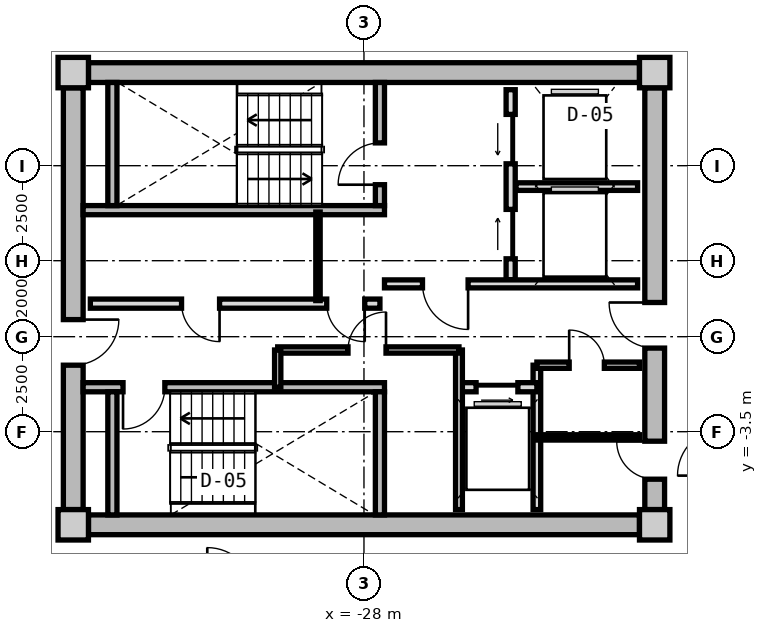
"""IFC4 building model, lengths in metres.
Left out: names, types, materials, properties, quantities, classifications, styles, units other than length and angle.
Written with IfcOpenShell. Run it as: python <this file> out.ifc"""

import sys

from ifc_helpers import new_model, si_unit, direction, frame, frame_2d, origin, origin_2d, place, context, subcontext, project, spatial, rectangle, extrude, source, transform, mapped, element, fill, save


model = new_model("IFC4")
c1 = context("Model", 3, precision=1e-05, world=origin(), true_north=direction((0.0, 1.0)))
c2 = subcontext(c1, "Body", "Model", "MODEL_VIEW")
j1 = project(units=[si_unit("LENGTHUNIT", "METRE"), si_unit("PLANEANGLEUNIT", "RADIAN")], contexts=[c1])
p1 = place(None, origin())
s1 = spatial("IfcSite", under=j1, at=p1, CompositionType="ELEMENT")
p2 = place(p1, origin())
s2 = spatial("IfcBuilding", under=s1, at=p2, CompositionType="ELEMENT")
p3 = place(p2, frame((0.0, 0.0, 229.15)))
s3 = spatial("IfcBuildingStorey", under=s2, at=p3, CompositionType="ELEMENT", Elevation=229.15)
m1 = source(origin(), c2, "Body", "SweptSolid", [
    extrude(rectangle(XDim=0.8, YDim=0.8, at=origin_2d()), origin(), (0.0, 0.0, 1.0), 3.05),
])
for number, where, z_axis, x_axis in (
    (1, (-35.65, -5.95, 0.0), (0.0, 0.0, 1.0), (1.0, 0.0, 0.0)),
    (2, (-20.35, -5.95, 0.0), (0.0, 0.0, 1.0), (1.0, 0.0, 0.0)),
    (3, (-20.35, 5.95, 0.0), (0.0, 0.0, 1.0), (1.0, 0.0, 0.0)),
    (4, (-35.65, 5.95, 0.0), (0.0, 0.0, 1.0), (1.0, 0.0, 0.0)),
):
    element("IfcColumn", number, at=place(p3, frame(where, z_axis=z_axis, x_axis=x_axis)), inside=s3, PredefinedType="COLUMN", context=c2, shape_type="MappedRepresentation", body=[
        mapped(m1, transform((0.0, 0.0, 0.0), x_axis=(1.0, 0.0, 0.0), y_axis=(0.0, 1.0, 0.0), z_axis=(0.0, 0.0, 1.0), scale=1.0)),
    ])
m2 = source(origin(), c2, "Body", "SweptSolid", [
    extrude(rectangle(XDim=14.5, YDim=0.52, at=frame_2d((7.25, 0.0))), origin(), (0.0, 0.0, 1.0), 2.81),
])
for number, where, z_axis, x_axis in (
    (5, (-35.25, 5.95, 0.0), (0.0, 0.0, 1.0), (1.0, 0.0, 0.0)),
    (6, (-20.75, -5.95, 0.0), (0.0, 0.0, 1.0), (-1.0, 0.0, 0.0)),
):
    element("IfcWall", number, at=place(p3, frame(where, z_axis=z_axis, x_axis=x_axis)), inside=s3, PredefinedType="SHEAR", context=c2, shape_type="MappedRepresentation", body=[
        mapped(m2, transform((0.0, 0.0, 0.0), x_axis=(1.0, 0.0, 0.0), y_axis=(0.0, 1.0, 0.0), z_axis=(0.0, 0.0, 1.0), scale=1.0)),
    ])
m3 = source(origin(), c2, "Body", "SweptSolid", [
    extrude(rectangle(XDim=11.1, YDim=0.52, at=frame_2d((5.55, 0.0))), origin(), (0.0, 0.0, 1.0), 2.81),
])
p4 = place(p3, frame((-35.65, -5.55, 0.0), z_axis=(0.0, 0.0, 1.0), x_axis=(0.0, 1.0, 0.0)))
e7 = element("IfcWall", 7, at=p4, inside=s3, PredefinedType="SHEAR", context=c2, shape_type="MappedRepresentation", body=[
    mapped(m3, transform((0.0, 0.0, 0.0), x_axis=(1.0, 0.0, 0.0), y_axis=(0.0, 1.0, 0.0), z_axis=(0.0, 0.0, 1.0), scale=1.0)),
])
p5 = place(p4, frame((3.8, 0.0, 0.0)))
e8 = element("IfcOpeningElement", 8, at=p5, cuts=e7, PredefinedType="OPENING", context=c2, shape_type="SweptSolid", body=[
    extrude(rectangle(XDim=1.2, YDim=2.15, at=frame_2d((0.6, 1.075))), frame((0.0, 0.27, 0.0), z_axis=(0.0, -1.0, 0.0), x_axis=(1.0, 0.0, 0.0)), (0.0, 0.0, 1.0), 0.54),
])
p6 = place(p3, frame((-20.35, 5.55, 0.0), z_axis=(0.0, 0.0, 1.0), x_axis=(0.0, -1.0, 0.0)))
e9 = element("IfcWall", 9, at=p6, inside=s3, PredefinedType="SHEAR", context=c2, shape_type="MappedRepresentation", body=[
    mapped(m3, transform((0.0, 0.0, 0.0), x_axis=(1.0, 0.0, 0.0), y_axis=(0.0, 1.0, 0.0), z_axis=(0.0, 0.0, 1.0), scale=1.0)),
])
p7 = place(p6, frame((5.65, 0.0, 0.0)))
e10 = element("IfcOpeningElement", 10, at=p7, cuts=e9, PredefinedType="OPENING", context=c2, shape_type="SweptSolid", body=[
    extrude(rectangle(XDim=1.2, YDim=2.15, at=frame_2d((0.6, 1.075))), frame((0.0, 0.27, 0.0), z_axis=(0.0, -1.0, 0.0), x_axis=(1.0, 0.0, 0.0)), (0.0, 0.0, 1.0), 0.54),
])
p8 = place(p6, frame((9.3, 0.0, 0.0)))
e11 = element("IfcOpeningElement", 11, at=p8, cuts=e9, PredefinedType="OPENING", context=c2, shape_type="SweptSolid", body=[
    extrude(rectangle(XDim=1.0, YDim=2.1, at=frame_2d((0.5, 1.05))), frame((0.0, 0.27, 0.0), z_axis=(0.0, -1.0, 0.0), x_axis=(1.0, 0.0, 0.0)), (0.0, 0.0, 1.0), 0.54),
])
m4 = source(origin(), c2, "Body", "SweptSolid", [
    extrude(rectangle(XDim=7.93, YDim=0.24, at=frame_2d((3.965, 0.0))), origin(), (0.0, 0.0, 1.0), 2.81),
])
p9 = place(p3, frame((-35.39, 2.33, 0.0), z_axis=(0.0, 0.0, 1.0), x_axis=(1.0, 0.0, 0.0)))
e12 = element("IfcWall", 12, at=p9, inside=s3, PredefinedType="PARTITIONING", context=c2, shape_type="MappedRepresentation", body=[
    mapped(m4, transform((0.0, 0.0, 0.0), x_axis=(1.0, 0.0, 0.0), y_axis=(0.0, 1.0, 0.0), z_axis=(0.0, 0.0, 1.0), scale=1.0)),
])
m5 = source(origin(), c2, "Body", "SweptSolid", [
    extrude(rectangle(XDim=3.24, YDim=0.24, at=frame_2d((1.62, 0.0))), origin(), (0.0, 0.0, 1.0), 2.81),
])
p10 = place(p3, frame((-34.62, 2.45, 0.0), z_axis=(0.0, 0.0, 1.0), x_axis=(0.0, 1.0, 0.0)))
e13 = element("IfcWall", 13, at=p10, inside=s3, PredefinedType="PARTITIONING", context=c2, shape_type="MappedRepresentation", body=[
    mapped(m5, transform((0.0, 0.0, 0.0), x_axis=(1.0, 0.0, 0.0), y_axis=(0.0, 1.0, 0.0), z_axis=(0.0, 0.0, 1.0), scale=1.0)),
])
p11 = place(p3, frame((-27.58, 2.45, 0.0), z_axis=(0.0, 0.0, 1.0), x_axis=(0.0, 1.0, 0.0)))
e14 = element("IfcWall", 14, at=p11, inside=s3, PredefinedType="PARTITIONING", context=c2, shape_type="MappedRepresentation", body=[
    mapped(m5, transform((0.0, 0.0, 0.0), x_axis=(1.0, 0.0, 0.0), y_axis=(0.0, 1.0, 0.0), z_axis=(0.0, 0.0, 1.0), scale=1.0)),
])
p12 = place(p11, frame((0.55, 0.0, 0.0)))
e15 = element("IfcOpeningElement", 15, at=p12, cuts=e14, PredefinedType="OPENING", context=c2, shape_type="SweptSolid", body=[
    extrude(rectangle(XDim=1.1, YDim=2.15, at=frame_2d((0.55, 1.075))), frame((0.0, 0.13, 0.0), z_axis=(0.0, -1.0, 0.0), x_axis=(1.0, 0.0, 0.0)), (0.0, 0.0, 1.0), 0.26),
])
p13 = place(p3, frame((-35.39, -2.33, 0.0), z_axis=(0.0, 0.0, 1.0), x_axis=(1.0, 0.0, 0.0)))
e16 = element("IfcWall", 16, at=p13, inside=s3, PredefinedType="PARTITIONING", context=c2, shape_type="MappedRepresentation", body=[
    mapped(m4, transform((0.0, 0.0, 0.0), x_axis=(1.0, 0.0, 0.0), y_axis=(0.0, 1.0, 0.0), z_axis=(0.0, 0.0, 1.0), scale=1.0)),
])
p14 = place(p13, frame((1.05, 0.0, 0.0)))
e17 = element("IfcOpeningElement", 17, at=p14, cuts=e16, PredefinedType="OPENING", context=c2, shape_type="SweptSolid", body=[
    extrude(rectangle(XDim=1.1, YDim=2.15, at=frame_2d((0.55, 1.075))), frame((0.0, 0.13, 0.0), z_axis=(0.0, -1.0, 0.0), x_axis=(1.0, 0.0, 0.0)), (0.0, 0.0, 1.0), 0.26),
])
for number, where, z_axis, x_axis in (
    (18, (-34.62, -5.69, 0.0), (0.0, 0.0, 1.0), (0.0, 1.0, 0.0)),
    (19, (-27.58, -5.69, 0.0), (0.0, 0.0, 1.0), (0.0, 1.0, 0.0)),
):
    element("IfcWall", number, at=place(p3, frame(where, z_axis=z_axis, x_axis=x_axis)), inside=s3, PredefinedType="PARTITIONING", context=c2, shape_type="MappedRepresentation", body=[
        mapped(m5, transform((0.0, 0.0, 0.0), x_axis=(1.0, 0.0, 0.0), y_axis=(0.0, 1.0, 0.0), z_axis=(0.0, 0.0, 1.0), scale=1.0)),
    ])
m6 = source(origin(), c2, "Body", "SweptSolid", [
    extrude(rectangle(XDim=5.0, YDim=0.24, at=frame_2d((2.5, 0.0))), origin(), (0.0, 0.0, 1.0), 2.795),
])
p15 = place(p3, frame((-24.14, 0.5, 0.0), z_axis=(0.0, 0.0, 1.0), x_axis=(0.0, 1.0, 0.0)))
e20 = element("IfcWall", 20, at=p15, inside=s3, PredefinedType="PARTITIONING", context=c2, shape_type="MappedRepresentation", body=[
    mapped(m6, transform((0.0, 0.0, 0.0), x_axis=(1.0, 0.0, 0.0), y_axis=(0.0, 1.0, 0.0), z_axis=(0.0, 0.0, 1.0), scale=1.0)),
])
p16 = place(p15, frame((3.05, 0.0, 0.0)))
e21 = element("IfcOpeningElement", 21, at=p16, cuts=e20, PredefinedType="OPENING", context=c2, shape_type="SweptSolid", body=[
    extrude(rectangle(XDim=1.3, YDim=2.2, at=frame_2d((0.65, 1.1))), frame((0.0, 0.13, 0.0), z_axis=(0.0, -1.0, 0.0), x_axis=(1.0, 0.0, 0.0)), (0.0, 0.0, 1.0), 0.26),
])
p17 = place(p15, frame((0.55, 0.0, 0.0)))
e22 = element("IfcOpeningElement", 22, at=p17, cuts=e20, PredefinedType="OPENING", context=c2, shape_type="SweptSolid", body=[
    extrude(rectangle(XDim=1.3, YDim=2.2, at=frame_2d((0.65, 1.1))), frame((0.0, 0.13, 0.0), z_axis=(0.0, -1.0, 0.0), x_axis=(1.0, 0.0, 0.0)), (0.0, 0.0, 1.0), 0.26),
])
m7 = source(origin(), c2, "Body", "SweptSolid", [
    extrude(rectangle(XDim=3.2, YDim=0.2, at=frame_2d((1.6, 0.0))), origin(), (0.0, 0.0, 1.0), 2.795),
])
p18 = place(p3, frame((-24.0, 2.95, 0.0), z_axis=(0.0, 0.0, 1.0), x_axis=(1.0, 0.0, 0.0)))
e23 = element("IfcWall", 23, at=p18, inside=s3, PredefinedType="PARTITIONING", context=c2, shape_type="MappedRepresentation", body=[
    mapped(m7, transform((0.0, 0.0, 0.0), x_axis=(1.0, 0.0, 0.0), y_axis=(0.0, 1.0, 0.0), z_axis=(0.0, 0.0, 1.0), scale=1.0)),
])
m8 = source(origin(), c2, "Body", "SweptSolid", [
    extrude(rectangle(XDim=6.66, YDim=0.21, at=frame_2d((3.33, 0.0))), origin(), (0.0, 0.0, 1.0), 2.795),
])
p19 = place(p3, frame((-27.46, 0.39, 0.0), z_axis=(0.0, 0.0, 1.0), x_axis=(1.0, 0.0, 0.0)))
e24 = element("IfcWall", 24, at=p19, inside=s3, PredefinedType="PARTITIONING", context=c2, shape_type="MappedRepresentation", body=[
    mapped(m8, transform((0.0, 0.0, 0.0), x_axis=(1.0, 0.0, 0.0), y_axis=(0.0, 1.0, 0.0), z_axis=(0.0, 0.0, 1.0), scale=1.0)),
])
p20 = place(p19, frame((1.0, 0.0, 0.0)))
e25 = element("IfcOpeningElement", 25, at=p20, cuts=e24, PredefinedType="OPENING", context=c2, shape_type="SweptSolid", body=[
    extrude(rectangle(XDim=1.2, YDim=2.15, at=frame_2d((0.6, 1.075))), frame((0.0, 0.115, 0.0), z_axis=(0.0, -1.0, 0.0), x_axis=(1.0, 0.0, 0.0)), (0.0, 0.0, 1.0), 0.23),
])
m9 = source(origin(), c2, "Body", "SweptSolid", [
    extrude(rectangle(XDim=7.62, YDim=0.24, at=frame_2d((3.81, 0.0))), origin(), (0.0, 0.0, 1.0), 2.795),
])
p21 = place(p3, frame((-35.2, -0.13, 0.0), z_axis=(0.0, 0.0, 1.0), x_axis=(1.0, 0.0, 0.0)))
e26 = element("IfcWall", 26, at=p21, inside=s3, PredefinedType="PARTITIONING", context=c2, shape_type="MappedRepresentation", body=[
    mapped(m9, transform((0.0, 0.0, 0.0), x_axis=(1.0, 0.0, 0.0), y_axis=(0.0, 1.0, 0.0), z_axis=(0.0, 0.0, 1.0), scale=1.0)),
])
p22 = place(p21, frame((6.22, 0.0, 0.0)))
e27 = element("IfcOpeningElement", 27, at=p22, cuts=e26, PredefinedType="OPENING", context=c2, shape_type="SweptSolid", body=[
    extrude(rectangle(XDim=1.0, YDim=2.1, at=frame_2d((0.5, 1.05))), frame((0.0, 0.13, 0.0), z_axis=(0.0, -1.0, 0.0), x_axis=(1.0, 0.0, 0.0)), (0.0, 0.0, 1.0), 0.26),
])
p23 = place(p21, frame((2.4, 0.0, 0.0)))
e28 = element("IfcOpeningElement", 28, at=p23, cuts=e26, PredefinedType="OPENING", context=c2, shape_type="SweptSolid", body=[
    extrude(rectangle(XDim=1.0, YDim=2.1, at=frame_2d((0.5, 1.05))), frame((0.0, 0.13, 0.0), z_axis=(0.0, -1.0, 0.0), x_axis=(1.0, 0.0, 0.0)), (0.0, 0.0, 1.0), 0.26),
])
m10 = source(origin(), c2, "Body", "SweptSolid", [
    extrude(rectangle(XDim=2.33, YDim=0.115, at=frame_2d((1.165, 0.0))), origin(), (0.0, 0.0, 1.0), 2.795),
])
p24 = place(p3, frame((-29.21, -0.05, 0.0), z_axis=(0.0, 0.0, 1.0), x_axis=(0.0, 1.0, 0.0)))
e29 = element("IfcWall", 29, at=p24, inside=s3, PredefinedType="PARTITIONING", context=c2, shape_type="MappedRepresentation", body=[
    mapped(m10, transform((0.0, 0.0, 0.0), x_axis=(1.0, 0.0, 0.0), y_axis=(0.0, 1.0, 0.0), z_axis=(0.0, 0.0, 1.0), scale=1.0)),
])
m11 = source(origin(), c2, "Body", "SweptSolid", [
    extrude(rectangle(XDim=3.8, YDim=0.2, at=frame_2d((1.9, 0.0))), origin(), (0.0, 0.0, 1.0), 2.795),
])
p25 = place(p3, frame((-23.45, -5.55, 0.0), z_axis=(0.0, 0.0, 1.0), x_axis=(0.0, 1.0, 0.0)))
e30 = element("IfcWall", 30, at=p25, inside=s3, PredefinedType="PARTITIONING", context=c2, shape_type="MappedRepresentation", body=[
    mapped(m11, transform((0.0, 0.0, 0.0), x_axis=(1.0, 0.0, 0.0), y_axis=(0.0, 1.0, 0.0), z_axis=(0.0, 0.0, 1.0), scale=1.0)),
])
m12 = source(origin(), c2, "Body", "SweptSolid", [
    extrude(rectangle(XDim=2.05, YDim=0.24, at=frame_2d((1.025, 0.0))), origin(), (0.0, 0.0, 1.0), 2.795),
])
p26 = place(p3, frame((-25.5, -2.33, 0.0), z_axis=(0.0, 0.0, 1.0), x_axis=(1.0, 0.0, 0.0)))
e31 = element("IfcWall", 31, at=p26, inside=s3, PredefinedType="PARTITIONING", context=c2, shape_type="MappedRepresentation", body=[
    mapped(m12, transform((0.0, 0.0, 0.0), x_axis=(1.0, 0.0, 0.0), y_axis=(0.0, 1.0, 0.0), z_axis=(0.0, 0.0, 1.0), scale=1.0)),
])
p27 = place(p26, frame((0.45, 0.0, 0.0)))
e32 = element("IfcOpeningElement", 32, at=p27, cuts=e31, PredefinedType="OPENING", context=c2, shape_type="SweptSolid", body=[
    extrude(rectangle(XDim=1.1, YDim=2.2, at=frame_2d((0.55, 1.1))), frame((0.0, 0.13, 0.0), z_axis=(0.0, -1.0, 0.0), x_axis=(1.0, 0.0, 0.0)), (0.0, 0.0, 1.0), 0.26),
])
m13 = source(origin(), c2, "Body", "SweptSolid", [
    extrude(rectangle(XDim=4.2, YDim=0.18, at=frame_2d((2.1, 0.0))), origin(), (0.0, 0.0, 1.0), 2.795),
])
p28 = place(p3, frame((-25.5, -5.55, 0.0), z_axis=(0.0, 0.0, 1.0), x_axis=(0.0, 1.0, 0.0)))
e33 = element("IfcWall", 33, at=p28, inside=s3, PredefinedType="PARTITIONING", context=c2, shape_type="MappedRepresentation", body=[
    mapped(m13, transform((0.0, 0.0, 0.0), x_axis=(1.0, 0.0, 0.0), y_axis=(0.0, 1.0, 0.0), z_axis=(0.0, 0.0, 1.0), scale=1.0)),
])
m14 = source(origin(), c2, "Body", "SweptSolid", [
    extrude(rectangle(XDim=4.77, YDim=0.165, at=frame_2d((2.385, 0.0))), origin(), (0.0, 0.0, 1.0), 2.795),
])
p29 = place(p3, frame((-30.27, -1.35, 0.0), z_axis=(0.0, 0.0, 1.0), x_axis=(1.0, 0.0, 0.0)))
e34 = element("IfcWall", 34, at=p29, inside=s3, PredefinedType="PARTITIONING", context=c2, shape_type="MappedRepresentation", body=[
    mapped(m14, transform((0.0, 0.0, 0.0), x_axis=(1.0, 0.0, 0.0), y_axis=(0.0, 1.0, 0.0), z_axis=(0.0, 0.0, 1.0), scale=1.0)),
])
p30 = place(p29, frame((1.85, 0.0, 0.0)))
e35 = element("IfcOpeningElement", 35, at=p30, cuts=e34, PredefinedType="OPENING", context=c2, shape_type="SweptSolid", body=[
    extrude(rectangle(XDim=1.0, YDim=2.1, at=frame_2d((0.5, 1.05))), frame((0.0, 0.093, 0.0), z_axis=(0.0, -1.0, 0.0), x_axis=(1.0, 0.0, 0.0)), (0.0, 0.0, 1.0), 0.185),
])
m15 = source(origin(), c2, "Body", "SweptSolid", [
    extrude(rectangle(XDim=0.98, YDim=0.165, at=frame_2d((0.49, 0.0))), origin(), (0.0, 0.0, 1.0), 2.795),
])
p31 = place(p3, frame((-30.27, -2.33, 0.0), z_axis=(0.0, 0.0, 1.0), x_axis=(0.0, 1.0, 0.0)))
e36 = element("IfcWall", 36, at=p31, inside=s3, PredefinedType="PARTITIONING", context=c2, shape_type="MappedRepresentation", body=[
    mapped(m15, transform((0.0, 0.0, 0.0), x_axis=(1.0, 0.0, 0.0), y_axis=(0.0, 1.0, 0.0), z_axis=(0.0, 0.0, 1.0), scale=1.0)),
])
m16 = source(origin(), c2, "Body", "SweptSolid", [
    extrude(rectangle(XDim=2.7, YDim=0.165, at=frame_2d((1.35, 0.0))), origin(), (0.0, 0.0, 1.0), 2.795),
])
p32 = place(p3, frame((-23.45, -1.75, 0.0), z_axis=(0.0, 0.0, 1.0), x_axis=(1.0, 0.0, 0.0)))
e37 = element("IfcWall", 37, at=p32, inside=s3, PredefinedType="PARTITIONING", context=c2, shape_type="MappedRepresentation", body=[
    mapped(m16, transform((0.0, 0.0, 0.0), x_axis=(1.0, 0.0, 0.0), y_axis=(0.0, 1.0, 0.0), z_axis=(0.0, 0.0, 1.0), scale=1.0)),
])
p33 = place(p32, frame((0.85, 0.0, 0.0)))
e38 = element("IfcOpeningElement", 38, at=p33, cuts=e37, PredefinedType="OPENING", context=c2, shape_type="SweptSolid", body=[
    extrude(rectangle(XDim=0.925, YDim=2.1, at=frame_2d((0.462, 1.05))), frame((0.0, 0.093, 0.0), z_axis=(0.0, -1.0, 0.0), x_axis=(1.0, 0.0, 0.0)), (0.0, 0.0, 1.0), 0.185),
])
m17 = source(origin(), c2, "Body", "SweptSolid", [
    extrude(rectangle(XDim=2.7, YDim=0.14, at=frame_2d((1.35, 0.0))), origin(), (0.0, 0.0, 1.0), 2.795),
])
p34 = place(p3, frame((-23.45, -3.65, 0.0), z_axis=(0.0, 0.0, 1.0), x_axis=(1.0, 0.0, 0.0)))
e39 = element("IfcWall", 39, at=p34, inside=s3, PredefinedType="PARTITIONING", context=c2, shape_type="MappedRepresentation", body=[
    mapped(m17, transform((0.0, 0.0, 0.0), x_axis=(1.0, 0.0, 0.0), y_axis=(0.0, 1.0, 0.0), z_axis=(0.0, 0.0, 1.0), scale=1.0)),
])
m18 = source(origin(), c2, "Body", "SweptSolid", [
    extrude(rectangle(XDim=1.1, YDim=2.15, at=frame_2d((0.55, 1.075))), frame((0.0, 0.025, 0.0), z_axis=(0.0, -1.0, 0.0), x_axis=(1.0, 0.0, 0.0)), (0.0, 0.0, 1.0), 0.05),
])
p35 = place(p12, origin())
e40 = element("IfcDoor", 40, at=p35, inside=s3, OperationType="SINGLE_SWING_LEFT", PredefinedType="DOOR", context=c2, shape_type="MappedRepresentation", body=[
    mapped(m18, transform((0.0, 0.0, 0.0), x_axis=(1.0, 0.0, 0.0), y_axis=(0.0, 1.0, 0.0), z_axis=(0.0, 0.0, 1.0), scale=1.0)),
])
fill(e15, e40)
p36 = place(p14, frame((1.1, 0.0, 0.0), z_axis=(0.0, 0.0, 1.0), x_axis=(-1.0, 0.0, 0.0)))
e41 = element("IfcDoor", 41, at=p36, inside=s3, OperationType="SINGLE_SWING_RIGHT", PredefinedType="DOOR", context=c2, shape_type="MappedRepresentation", body=[
    mapped(m18, transform((0.0, 0.0, 0.0), x_axis=(1.0, 0.0, 0.0), y_axis=(0.0, 1.0, 0.0), z_axis=(0.0, 0.0, 1.0), scale=1.0)),
])
fill(e17, e41)
m19 = source(origin(), c2, "Body", "SweptSolid", [
    extrude(rectangle(XDim=1.3, YDim=2.2, at=frame_2d((0.65, 1.1))), frame((0.0, 0.025, 0.0), z_axis=(0.0, -1.0, 0.0), x_axis=(1.0, 0.0, 0.0)), (0.0, 0.0, 1.0), 0.05),
])
p37 = place(p16, origin())
e42 = element("IfcDoor", 42, at=p37, inside=s3, OperationType="SLIDING_TO_LEFT", PredefinedType="DOOR", context=c2, shape_type="MappedRepresentation", body=[
    mapped(m19, transform((0.0, 0.0, 0.0), x_axis=(1.0, 0.0, 0.0), y_axis=(0.0, 1.0, 0.0), z_axis=(0.0, 0.0, 1.0), scale=1.0)),
])
fill(e21, e42)
p38 = place(p17, origin())
e43 = element("IfcDoor", 43, at=p38, inside=s3, OperationType="SLIDING_TO_RIGHT", PredefinedType="DOOR", context=c2, shape_type="MappedRepresentation", body=[
    mapped(m19, transform((0.0, 0.0, 0.0), x_axis=(1.0, 0.0, 0.0), y_axis=(0.0, 1.0, 0.0), z_axis=(0.0, 0.0, 1.0), scale=1.0)),
])
fill(e22, e43)
m20 = source(origin(), c2, "Body", "SweptSolid", [
    extrude(rectangle(XDim=1.2, YDim=2.15, at=frame_2d((0.6, 1.075))), frame((0.0, 0.025, 0.0), z_axis=(0.0, -1.0, 0.0), x_axis=(1.0, 0.0, 0.0)), (0.0, 0.0, 1.0), 0.05),
])
p39 = place(p20, frame((1.2, 0.0, 0.0), z_axis=(0.0, 0.0, 1.0), x_axis=(-1.0, 0.0, 0.0)))
e44 = element("IfcDoor", 44, at=p39, inside=s3, OperationType="SINGLE_SWING_LEFT", PredefinedType="DOOR", context=c2, shape_type="MappedRepresentation", body=[
    mapped(m20, transform((0.0, 0.0, 0.0), x_axis=(1.0, 0.0, 0.0), y_axis=(0.0, 1.0, 0.0), z_axis=(0.0, 0.0, 1.0), scale=1.0)),
])
fill(e25, e44)
p40 = place(p5, frame((1.2, 0.0, 0.0), z_axis=(0.0, 0.0, 1.0), x_axis=(-1.0, 0.0, 0.0)))
e45 = element("IfcDoor", 45, at=p40, inside=s3, OperationType="SINGLE_SWING_LEFT", PredefinedType="DOOR", context=c2, shape_type="MappedRepresentation", body=[
    mapped(m20, transform((0.0, 0.0, 0.0), x_axis=(1.0, 0.0, 0.0), y_axis=(0.0, 1.0, 0.0), z_axis=(0.0, 0.0, 1.0), scale=1.0)),
])
fill(e8, e45)
p41 = place(p7, frame((1.2, 0.0, 0.0), z_axis=(0.0, 0.0, 1.0), x_axis=(-1.0, 0.0, 0.0)))
e46 = element("IfcDoor", 46, at=p41, inside=s3, OperationType="SINGLE_SWING_RIGHT", PredefinedType="DOOR", context=c2, shape_type="MappedRepresentation", body=[
    mapped(m20, transform((0.0, 0.0, 0.0), x_axis=(1.0, 0.0, 0.0), y_axis=(0.0, 1.0, 0.0), z_axis=(0.0, 0.0, 1.0), scale=1.0)),
])
fill(e10, e46)
m21 = source(origin(), c2, "Body", "SweptSolid", [
    extrude(rectangle(XDim=1.0, YDim=2.1, at=frame_2d((0.5, 1.05))), frame((0.0, 0.025, 0.0), z_axis=(0.0, -1.0, 0.0), x_axis=(1.0, 0.0, 0.0)), (0.0, 0.0, 1.0), 0.05),
])
p42 = place(p22, frame((1.0, 0.0, 0.0), z_axis=(0.0, 0.0, 1.0), x_axis=(-1.0, 0.0, 0.0)))
e47 = element("IfcDoor", 47, at=p42, inside=s3, OperationType="SINGLE_SWING_LEFT", PredefinedType="DOOR", context=c2, shape_type="MappedRepresentation", body=[
    mapped(m21, transform((0.0, 0.0, 0.0), x_axis=(1.0, 0.0, 0.0), y_axis=(0.0, 1.0, 0.0), z_axis=(0.0, 0.0, 1.0), scale=1.0)),
])
fill(e27, e47)
p43 = place(p23, frame((1.0, 0.0, 0.0), z_axis=(0.0, 0.0, 1.0), x_axis=(-1.0, 0.0, 0.0)))
e48 = element("IfcDoor", 48, at=p43, inside=s3, OperationType="SINGLE_SWING_LEFT", PredefinedType="DOOR", context=c2, shape_type="MappedRepresentation", body=[
    mapped(m21, transform((0.0, 0.0, 0.0), x_axis=(1.0, 0.0, 0.0), y_axis=(0.0, 1.0, 0.0), z_axis=(0.0, 0.0, 1.0), scale=1.0)),
])
fill(e28, e48)
m22 = source(origin(), c2, "Body", "SweptSolid", [
    extrude(rectangle(XDim=1.1, YDim=2.2, at=frame_2d((0.55, 1.1))), frame((0.0, 0.025, 0.0), z_axis=(0.0, -1.0, 0.0), x_axis=(1.0, 0.0, 0.0)), (0.0, 0.0, 1.0), 0.05),
])
p44 = place(p27, frame((1.1, 0.0, 0.0), z_axis=(0.0, 0.0, 1.0), x_axis=(-1.0, 0.0, 0.0)))
e49 = element("IfcDoor", 49, at=p44, inside=s3, OperationType="SLIDING_TO_RIGHT", PredefinedType="DOOR", context=c2, shape_type="MappedRepresentation", body=[
    mapped(m22, transform((0.0, 0.0, 0.0), x_axis=(1.0, 0.0, 0.0), y_axis=(0.0, 1.0, 0.0), z_axis=(0.0, 0.0, 1.0), scale=1.0)),
])
fill(e32, e49)
p45 = place(p30, origin())
e50 = element("IfcDoor", 50, at=p45, inside=s3, OperationType="SINGLE_SWING_RIGHT", PredefinedType="DOOR", context=c2, shape_type="MappedRepresentation", body=[
    mapped(m21, transform((0.0, 0.0, 0.0), x_axis=(1.0, 0.0, 0.0), y_axis=(0.0, 1.0, 0.0), z_axis=(0.0, 0.0, 1.0), scale=1.0)),
])
fill(e35, e50)
m23 = source(origin(), c2, "Body", "SweptSolid", [
    extrude(rectangle(XDim=0.925, YDim=2.1, at=frame_2d((0.462, 1.05))), frame((0.0, 0.025, 0.0), z_axis=(0.0, -1.0, 0.0), x_axis=(1.0, 0.0, 0.0)), (0.0, 0.0, 1.0), 0.05),
])
p46 = place(p33, origin())
e51 = element("IfcDoor", 51, at=p46, inside=s3, OperationType="SINGLE_SWING_LEFT", PredefinedType="DOOR", context=c2, shape_type="MappedRepresentation", body=[
    mapped(m23, transform((0.0, 0.0, 0.0), x_axis=(1.0, 0.0, 0.0), y_axis=(0.0, 1.0, 0.0), z_axis=(0.0, 0.0, 1.0), scale=1.0)),
])
fill(e38, e51)
p47 = place(p8, frame((1.0, 0.0, 0.0), z_axis=(0.0, 0.0, 1.0), x_axis=(-1.0, 0.0, 0.0)))
e52 = element("IfcDoor", 52, at=p47, inside=s3, OperationType="SINGLE_SWING_RIGHT", PredefinedType="DOOR", context=c2, shape_type="MappedRepresentation", body=[
    mapped(m21, transform((0.0, 0.0, 0.0), x_axis=(1.0, 0.0, 0.0), y_axis=(0.0, 1.0, 0.0), z_axis=(0.0, 0.0, 1.0), scale=1.0)),
])
fill(e11, e52)
save(model, sys.argv[1])
